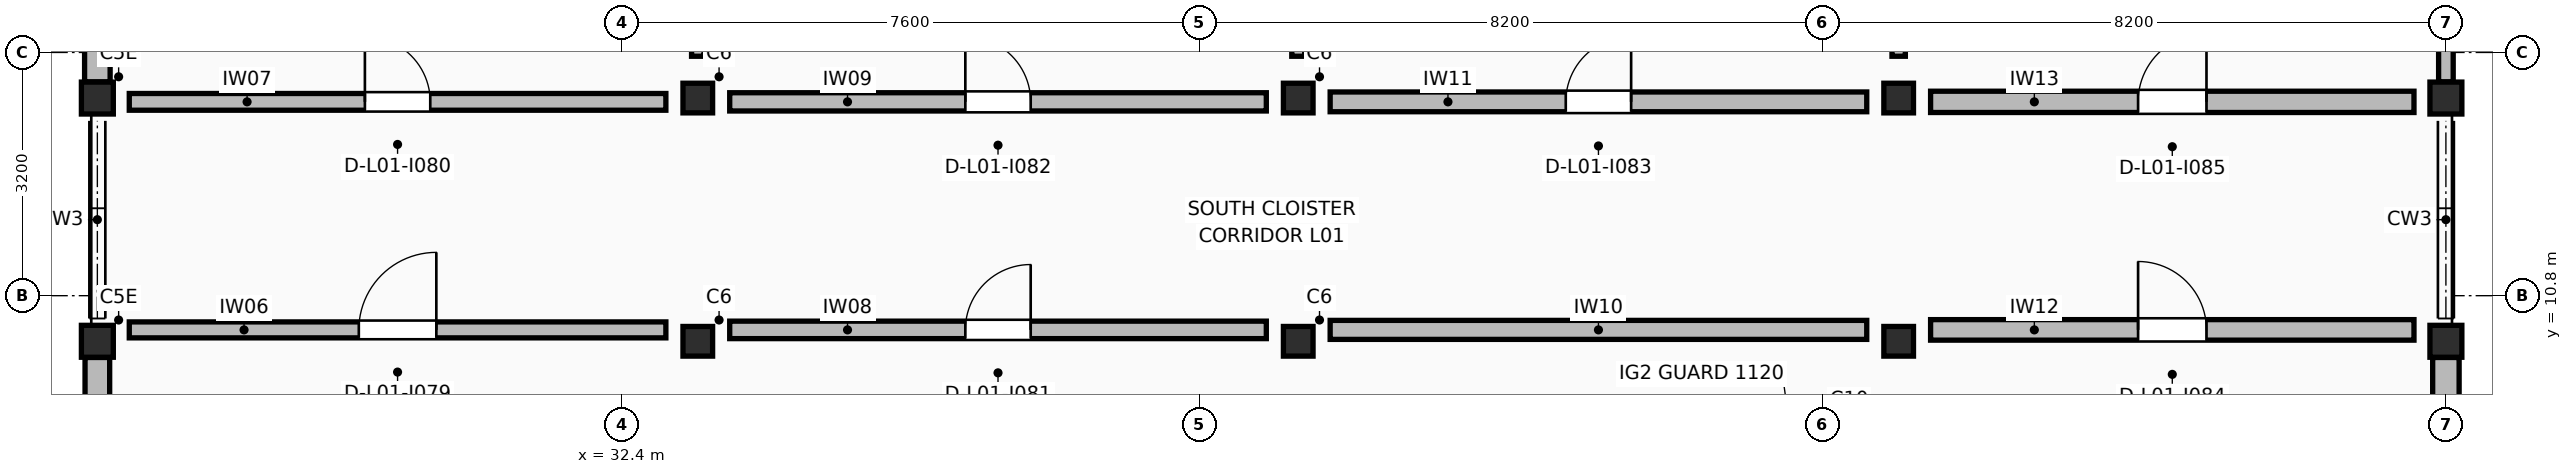
"""IFC4 building model, lengths in metres.
Left out: names, types, materials, properties, quantities, classifications, styles, units other than length and angle.
Written with IfcOpenShell. Run it as: python <this file> out.ifc"""

import sys

from ifc_helpers import new_model, si_unit, direction, frame, frame_2d, origin, origin_2d, place, context, subcontext, project, spatial, rectangle, extrude, element, fill, save


model = new_model("IFC4")
c1 = context("Model", 3, precision=1e-05, world=origin(), true_north=direction((0.0, 1.0)))
c2 = subcontext(c1, "Body", "Model", "MODEL_VIEW")
j1 = project(units=[si_unit("LENGTHUNIT", "METRE"), si_unit("PLANEANGLEUNIT", "RADIAN")], contexts=[c1])
p1 = place(None, origin())
s1 = spatial("IfcSite", under=j1, at=p1, CompositionType="ELEMENT")
p2 = place(p1, origin())
s2 = spatial("IfcBuilding", under=s1, at=p2, CompositionType="ELEMENT")
p3 = place(p2, frame((0.0, 0.0, 4.42)))
s3 = spatial("IfcBuildingStorey", under=s2, at=p3, CompositionType="ELEMENT", Elevation=4.42)
for number, where, z_axis, x_axis in (
    (1, (25.5, 10.2, 0.0), (0.0, 0.0, 1.0), (1.0, 0.0, 0.0)),
    (2, (25.5, 13.4, 0.0), (0.0, 0.0, 1.0), (1.0, 0.0, 0.0)),
):
    element("IfcColumn", number, at=place(p3, frame(where, z_axis=z_axis, x_axis=x_axis)), inside=s3, PredefinedType="COLUMN", context=c2, shape_type="SweptSolid", body=[
        extrude(rectangle(XDim=0.42, YDim=0.42, at=origin_2d()), origin(), (0.0, 0.0, 1.0), 3.74),
    ])
for number, where, z_axis, x_axis in (
    (3, (33.4, 10.2, 0.0), (0.0, 0.0, 1.0), (1.0, 0.0, 0.0)),
    (4, (33.4, 13.4, 0.0), (0.0, 0.0, 1.0), (1.0, 0.0, 0.0)),
    (5, (41.3, 10.2, 0.0), (0.0, 0.0, 1.0), (1.0, 0.0, 0.0)),
    (6, (41.3, 13.4, 0.0), (0.0, 0.0, 1.0), (1.0, 0.0, 0.0)),
    (7, (49.2, 10.2, 0.0), (0.0, 0.0, 1.0), (1.0, 0.0, 0.0)),
    (8, (49.2, 13.4, 0.0), (0.0, 0.0, 1.0), (1.0, 0.0, 0.0)),
):
    element("IfcColumn", number, at=place(p3, frame(where, z_axis=z_axis, x_axis=x_axis)), inside=s3, PredefinedType="COLUMN", context=c2, shape_type="SweptSolid", body=[
        extrude(rectangle(XDim=0.39, YDim=0.39, at=origin_2d()), origin(), (0.0, 0.0, 1.0), 3.74),
    ])
for number, where, z_axis, x_axis in (
    (9, (56.4, 10.2, 0.0), (0.0, 0.0, 1.0), (1.0, 0.0, 0.0)),
    (10, (56.4, 13.4, 0.0), (0.0, 0.0, 1.0), (1.0, 0.0, 0.0)),
):
    element("IfcColumn", number, at=place(p3, frame(where, z_axis=z_axis, x_axis=x_axis)), inside=s3, PredefinedType="COLUMN", context=c2, shape_type="SweptSolid", body=[
        extrude(rectangle(XDim=0.42, YDim=0.42, at=origin_2d()), origin(), (0.0, 0.0, 1.0), 3.74),
    ])
p4 = place(p3, frame((25.5, 4.413, 0.0), z_axis=(0.0, 0.0, 1.0), x_axis=(0.0, 1.0, 0.0)))
e11 = element("IfcWall", 11, at=p4, inside=s3, PredefinedType="STANDARD", context=c2, shape_type="SweptSolid", body=[
    extrude(rectangle(XDim=5.574, YDim=0.324, at=frame_2d((2.787, 0.0))), origin(), (0.0, 0.0, 1.0), 2.78),
])
p5 = place(p4, frame((2.237, 0.0, 0.95)))
e12 = element("IfcOpeningElement", 12, at=p5, cuts=e11, PredefinedType="OPENING", context=c2, shape_type="SweptSolid", body=[
    extrude(rectangle(XDim=1.1, YDim=1.3, at=frame_2d((0.55, 0.65))), frame((0.0, 0.172, 0.0), z_axis=(0.0, -1.0, 0.0), x_axis=(1.0, 0.0, 0.0)), (0.0, 0.0, 1.0), 0.344),
])
p6 = place(p3, frame((25.5, 13.613, 0.0), z_axis=(0.0, 0.0, 1.0), x_axis=(0.0, 1.0, 0.0)))
e13 = element("IfcWall", 13, at=p6, inside=s3, PredefinedType="STANDARD", context=c2, shape_type="SweptSolid", body=[
    extrude(rectangle(XDim=7.174, YDim=0.336, at=frame_2d((3.587, 0.0))), origin(), (0.0, 0.0, 1.0), 2.78),
])
p7 = place(p6, frame((3.037, 0.0, 0.95)))
e14 = element("IfcOpeningElement", 14, at=p7, cuts=e13, PredefinedType="OPENING", context=c2, shape_type="SweptSolid", body=[
    extrude(rectangle(XDim=1.1, YDim=1.45, at=frame_2d((0.55, 0.725))), frame((0.0, 0.178, 0.0), z_axis=(0.0, -1.0, 0.0), x_axis=(1.0, 0.0, 0.0)), (0.0, 0.0, 1.0), 0.356),
])
p8 = place(p3, frame((56.4, 4.413, 0.0), z_axis=(0.0, 0.0, 1.0), x_axis=(0.0, 1.0, 0.0)))
e15 = element("IfcWall", 15, at=p8, inside=s3, PredefinedType="STANDARD", context=c2, shape_type="SweptSolid", body=[
    extrude(rectangle(XDim=5.574, YDim=0.348, at=frame_2d((2.787, 0.0))), origin(), (0.0, 0.0, 1.0), 2.78),
])
p9 = place(p8, frame((2.237, 0.0, 0.95)))
e16 = element("IfcOpeningElement", 16, at=p9, cuts=e15, PredefinedType="OPENING", context=c2, shape_type="SweptSolid", body=[
    extrude(rectangle(XDim=1.1, YDim=1.6, at=frame_2d((0.55, 0.8))), frame((0.0, 0.184, 0.0), z_axis=(0.0, -1.0, 0.0), x_axis=(1.0, 0.0, 0.0)), (0.0, 0.0, 1.0), 0.368),
])
p10 = place(p3, frame((56.4, 13.613, 0.0), z_axis=(0.0, 0.0, 1.0), x_axis=(0.0, 1.0, 0.0)))
e17 = element("IfcWall", 17, at=p10, inside=s3, PredefinedType="STANDARD", context=c2, shape_type="SweptSolid", body=[
    extrude(rectangle(XDim=7.174, YDim=0.192, at=frame_2d((3.587, 0.0))), origin(), (0.0, 0.0, 1.0), 2.78),
])
p11 = place(p10, frame((2.977, 0.0, 0.95)))
e18 = element("IfcOpeningElement", 18, at=p11, cuts=e17, PredefinedType="OPENING", context=c2, shape_type="SweptSolid", body=[
    extrude(rectangle(XDim=1.22, YDim=1.15, at=frame_2d((0.61, 0.575))), frame((0.0, 0.106, 0.0), z_axis=(0.0, -1.0, 0.0), x_axis=(1.0, 0.0, 0.0)), (0.0, 0.0, 1.0), 0.212),
])
p12 = place(p3, frame((25.92, 10.35, 0.0), z_axis=(0.0, 0.0, 1.0), x_axis=(1.0, 0.0, 0.0)))
e19 = element("IfcWall", 19, at=p12, inside=s3, PredefinedType="STANDARD", context=c2, shape_type="SweptSolid", body=[
    extrude(rectangle(XDim=7.06, YDim=0.21, at=frame_2d((3.53, 0.0))), origin(), (0.0, 0.0, 1.0), 2.75),
])
p13 = place(p12, frame((3.02, 0.0, 0.0)))
e20 = element("IfcOpeningElement", 20, at=p13, cuts=e19, PredefinedType="OPENING", context=c2, shape_type="SweptSolid", body=[
    extrude(rectangle(XDim=1.02, YDim=2.24, at=frame_2d((0.51, 1.12))), frame((0.0, 0.115, 0.0), z_axis=(0.0, -1.0, 0.0), x_axis=(1.0, 0.0, 0.0)), (0.0, 0.0, 1.0), 0.23),
])
p14 = place(p3, frame((25.92, 13.35, 0.0), z_axis=(0.0, 0.0, 1.0), x_axis=(1.0, 0.0, 0.0)))
e21 = element("IfcWall", 21, at=p14, inside=s3, PredefinedType="STANDARD", context=c2, shape_type="SweptSolid", body=[
    extrude(rectangle(XDim=7.06, YDim=0.22, at=frame_2d((3.53, 0.0))), origin(), (0.0, 0.0, 1.0), 2.75),
])
p15 = place(p14, frame((3.1, 0.0, 0.0)))
e22 = element("IfcOpeningElement", 22, at=p15, cuts=e21, PredefinedType="OPENING", context=c2, shape_type="SweptSolid", body=[
    extrude(rectangle(XDim=0.86, YDim=2.06, at=frame_2d((0.43, 1.03))), frame((0.0, 0.12, 0.0), z_axis=(0.0, -1.0, 0.0), x_axis=(1.0, 0.0, 0.0)), (0.0, 0.0, 1.0), 0.24),
])
p16 = place(p3, frame((33.82, 10.35, 0.0), z_axis=(0.0, 0.0, 1.0), x_axis=(1.0, 0.0, 0.0)))
e23 = element("IfcWall", 23, at=p16, inside=s3, PredefinedType="STANDARD", context=c2, shape_type="SweptSolid", body=[
    extrude(rectangle(XDim=7.06, YDim=0.23, at=frame_2d((3.53, 0.0))), origin(), (0.0, 0.0, 1.0), 2.75),
])
p17 = place(p16, frame((3.1, 0.0, 0.0)))
e24 = element("IfcOpeningElement", 24, at=p17, cuts=e23, PredefinedType="OPENING", context=c2, shape_type="SweptSolid", body=[
    extrude(rectangle(XDim=0.86, YDim=2.12, at=frame_2d((0.43, 1.06))), frame((0.0, 0.125, 0.0), z_axis=(0.0, -1.0, 0.0), x_axis=(1.0, 0.0, 0.0)), (0.0, 0.0, 1.0), 0.25),
])
p18 = place(p3, frame((33.82, 13.35, 0.0), z_axis=(0.0, 0.0, 1.0), x_axis=(1.0, 0.0, 0.0)))
e25 = element("IfcWall", 25, at=p18, inside=s3, PredefinedType="STANDARD", context=c2, shape_type="SweptSolid", body=[
    extrude(rectangle(XDim=7.06, YDim=0.24, at=frame_2d((3.53, 0.0))), origin(), (0.0, 0.0, 1.0), 2.75),
])
p19 = place(p18, frame((3.1, 0.0, 0.0)))
e26 = element("IfcOpeningElement", 26, at=p19, cuts=e25, PredefinedType="OPENING", context=c2, shape_type="SweptSolid", body=[
    extrude(rectangle(XDim=0.86, YDim=2.18, at=frame_2d((0.43, 1.09))), frame((0.0, 0.13, 0.0), z_axis=(0.0, -1.0, 0.0), x_axis=(1.0, 0.0, 0.0)), (0.0, 0.0, 1.0), 0.26),
])
p20 = place(p3, frame((41.72, 10.35, 0.0), z_axis=(0.0, 0.0, 1.0), x_axis=(1.0, 0.0, 0.0)))
e27 = element("IfcWall", 27, at=p20, inside=s3, PredefinedType="STANDARD", context=c2, shape_type="SweptSolid", body=[
    extrude(rectangle(XDim=7.06, YDim=0.25, at=frame_2d((3.53, 0.0))), origin(), (0.0, 0.0, 1.0), 2.75),
])
p21 = place(p3, frame((41.72, 13.35, 0.0), z_axis=(0.0, 0.0, 1.0), x_axis=(1.0, 0.0, 0.0)))
e28 = element("IfcWall", 28, at=p21, inside=s3, PredefinedType="STANDARD", context=c2, shape_type="SweptSolid", body=[
    extrude(rectangle(XDim=7.06, YDim=0.26, at=frame_2d((3.53, 0.0))), origin(), (0.0, 0.0, 1.0), 2.75),
])
p22 = place(p21, frame((3.1, 0.0, 0.0)))
e29 = element("IfcOpeningElement", 29, at=p22, cuts=e28, PredefinedType="OPENING", context=c2, shape_type="SweptSolid", body=[
    extrude(rectangle(XDim=0.86, YDim=2.24, at=frame_2d((0.43, 1.12))), frame((0.0, 0.14, 0.0), z_axis=(0.0, -1.0, 0.0), x_axis=(1.0, 0.0, 0.0)), (0.0, 0.0, 1.0), 0.28),
])
p23 = place(p3, frame((49.62, 10.35, 0.0), z_axis=(0.0, 0.0, 1.0), x_axis=(1.0, 0.0, 0.0)))
e30 = element("IfcWall", 30, at=p23, inside=s3, PredefinedType="STANDARD", context=c2, shape_type="SweptSolid", body=[
    extrude(rectangle(XDim=6.36, YDim=0.27, at=frame_2d((3.18, 0.0))), origin(), (0.0, 0.0, 1.0), 2.75),
])
p24 = place(p23, frame((2.73, 0.0, 0.0)))
e31 = element("IfcOpeningElement", 31, at=p24, cuts=e30, PredefinedType="OPENING", context=c2, shape_type="SweptSolid", body=[
    extrude(rectangle(XDim=0.9, YDim=2.06, at=frame_2d((0.45, 1.03))), frame((0.0, 0.145, 0.0), z_axis=(0.0, -1.0, 0.0), x_axis=(1.0, 0.0, 0.0)), (0.0, 0.0, 1.0), 0.29),
])
p25 = place(p3, frame((49.62, 13.35, 0.0), z_axis=(0.0, 0.0, 1.0), x_axis=(1.0, 0.0, 0.0)))
e32 = element("IfcWall", 32, at=p25, inside=s3, PredefinedType="STANDARD", context=c2, shape_type="SweptSolid", body=[
    extrude(rectangle(XDim=6.36, YDim=0.28, at=frame_2d((3.18, 0.0))), origin(), (0.0, 0.0, 1.0), 2.75),
])
p26 = place(p25, frame((2.73, 0.0, 0.0)))
e33 = element("IfcOpeningElement", 33, at=p26, cuts=e32, PredefinedType="OPENING", context=c2, shape_type="SweptSolid", body=[
    extrude(rectangle(XDim=0.9, YDim=2.12, at=frame_2d((0.45, 1.06))), frame((0.0, 0.15, 0.0), z_axis=(0.0, -1.0, 0.0), x_axis=(1.0, 0.0, 0.0)), (0.0, 0.0, 1.0), 0.3),
])
p27 = place(p3, frame((33.4, 13.95, 0.0), z_axis=(0.0, 0.0, 1.0), x_axis=(0.0, 1.0, 0.0)))
e34 = element("IfcWall", 34, at=p27, inside=s3, PredefinedType="PARTITIONING", context=c2, shape_type="SweptSolid", body=[
    extrude(rectangle(XDim=6.2, YDim=0.164, at=frame_2d((3.1, 0.0))), origin(), (0.0, 0.0, 1.0), 2.75),
])
p28 = place(p3, frame((41.3, 13.95, 0.0), z_axis=(0.0, 0.0, 1.0), x_axis=(0.0, 1.0, 0.0)))
e35 = element("IfcWall", 35, at=p28, inside=s3, PredefinedType="PARTITIONING", context=c2, shape_type="SweptSolid", body=[
    extrude(rectangle(XDim=6.2, YDim=0.17, at=frame_2d((3.1, 0.0))), origin(), (0.0, 0.0, 1.0), 2.75),
])
p29 = place(p3, frame((49.2, 13.95, 0.0), z_axis=(0.0, 0.0, 1.0), x_axis=(0.0, 1.0, 0.0)))
e36 = element("IfcWall", 36, at=p29, inside=s3, PredefinedType="PARTITIONING", context=c2, shape_type="SweptSolid", body=[
    extrude(rectangle(XDim=6.2, YDim=0.176, at=frame_2d((3.1, 0.0))), origin(), (0.0, 0.0, 1.0), 2.75),
])
p30 = place(p13, origin())
e37 = element("IfcDoor", 37, at=p30, inside=s3, OperationType="SINGLE_SWING_RIGHT", PredefinedType="DOOR", context=c2, shape_type="SweptSolid", body=[
    extrude(rectangle(XDim=1.02, YDim=2.24, at=frame_2d((0.51, 1.12))), frame((0.0, 0.025, 0.0), z_axis=(0.0, -1.0, 0.0), x_axis=(1.0, 0.0, 0.0)), (0.0, 0.0, 1.0), 0.05),
])
fill(e20, e37)
p31 = place(p15, frame((0.86, 0.0, 0.0), z_axis=(0.0, 0.0, 1.0), x_axis=(-1.0, 0.0, 0.0)))
e38 = element("IfcDoor", 38, at=p31, inside=s3, OperationType="SINGLE_SWING_LEFT", PredefinedType="DOOR", context=c2, shape_type="SweptSolid", body=[
    extrude(rectangle(XDim=0.86, YDim=2.06, at=frame_2d((0.43, 1.03))), frame((0.0, 0.025, 0.0), z_axis=(0.0, -1.0, 0.0), x_axis=(1.0, 0.0, 0.0)), (0.0, 0.0, 1.0), 0.05),
])
fill(e22, e38)
p32 = place(p17, origin())
e39 = element("IfcDoor", 39, at=p32, inside=s3, OperationType="SINGLE_SWING_RIGHT", PredefinedType="DOOR", context=c2, shape_type="SweptSolid", body=[
    extrude(rectangle(XDim=0.86, YDim=2.12, at=frame_2d((0.43, 1.06))), frame((0.0, 0.025, 0.0), z_axis=(0.0, -1.0, 0.0), x_axis=(1.0, 0.0, 0.0)), (0.0, 0.0, 1.0), 0.05),
])
fill(e24, e39)
p33 = place(p19, frame((0.86, 0.0, 0.0), z_axis=(0.0, 0.0, 1.0), x_axis=(-1.0, 0.0, 0.0)))
e40 = element("IfcDoor", 40, at=p33, inside=s3, OperationType="SINGLE_SWING_LEFT", PredefinedType="DOOR", context=c2, shape_type="SweptSolid", body=[
    extrude(rectangle(XDim=0.86, YDim=2.18, at=frame_2d((0.43, 1.09))), frame((0.0, 0.025, 0.0), z_axis=(0.0, -1.0, 0.0), x_axis=(1.0, 0.0, 0.0)), (0.0, 0.0, 1.0), 0.05),
])
fill(e26, e40)
p34 = place(p22, frame((0.86, 0.0, 0.0), z_axis=(0.0, 0.0, 1.0), x_axis=(-1.0, 0.0, 0.0)))
e41 = element("IfcDoor", 41, at=p34, inside=s3, OperationType="SINGLE_SWING_RIGHT", PredefinedType="DOOR", context=c2, shape_type="SweptSolid", body=[
    extrude(rectangle(XDim=0.86, YDim=2.24, at=frame_2d((0.43, 1.12))), frame((0.0, 0.025, 0.0), z_axis=(0.0, -1.0, 0.0), x_axis=(1.0, 0.0, 0.0)), (0.0, 0.0, 1.0), 0.05),
])
fill(e29, e41)
p35 = place(p24, origin())
e42 = element("IfcDoor", 42, at=p35, inside=s3, OperationType="SINGLE_SWING_LEFT", PredefinedType="DOOR", context=c2, shape_type="SweptSolid", body=[
    extrude(rectangle(XDim=0.9, YDim=2.06, at=frame_2d((0.45, 1.03))), frame((0.0, 0.025, 0.0), z_axis=(0.0, -1.0, 0.0), x_axis=(1.0, 0.0, 0.0)), (0.0, 0.0, 1.0), 0.05),
])
fill(e31, e42)
p36 = place(p26, frame((0.9, 0.0, 0.0), z_axis=(0.0, 0.0, 1.0), x_axis=(-1.0, 0.0, 0.0)))
e43 = element("IfcDoor", 43, at=p36, inside=s3, OperationType="SINGLE_SWING_RIGHT", PredefinedType="DOOR", context=c2, shape_type="SweptSolid", body=[
    extrude(rectangle(XDim=0.9, YDim=2.12, at=frame_2d((0.45, 1.06))), frame((0.0, 0.025, 0.0), z_axis=(0.0, -1.0, 0.0), x_axis=(1.0, 0.0, 0.0)), (0.0, 0.0, 1.0), 0.05),
])
fill(e33, e43)
save(model, sys.argv[1])
